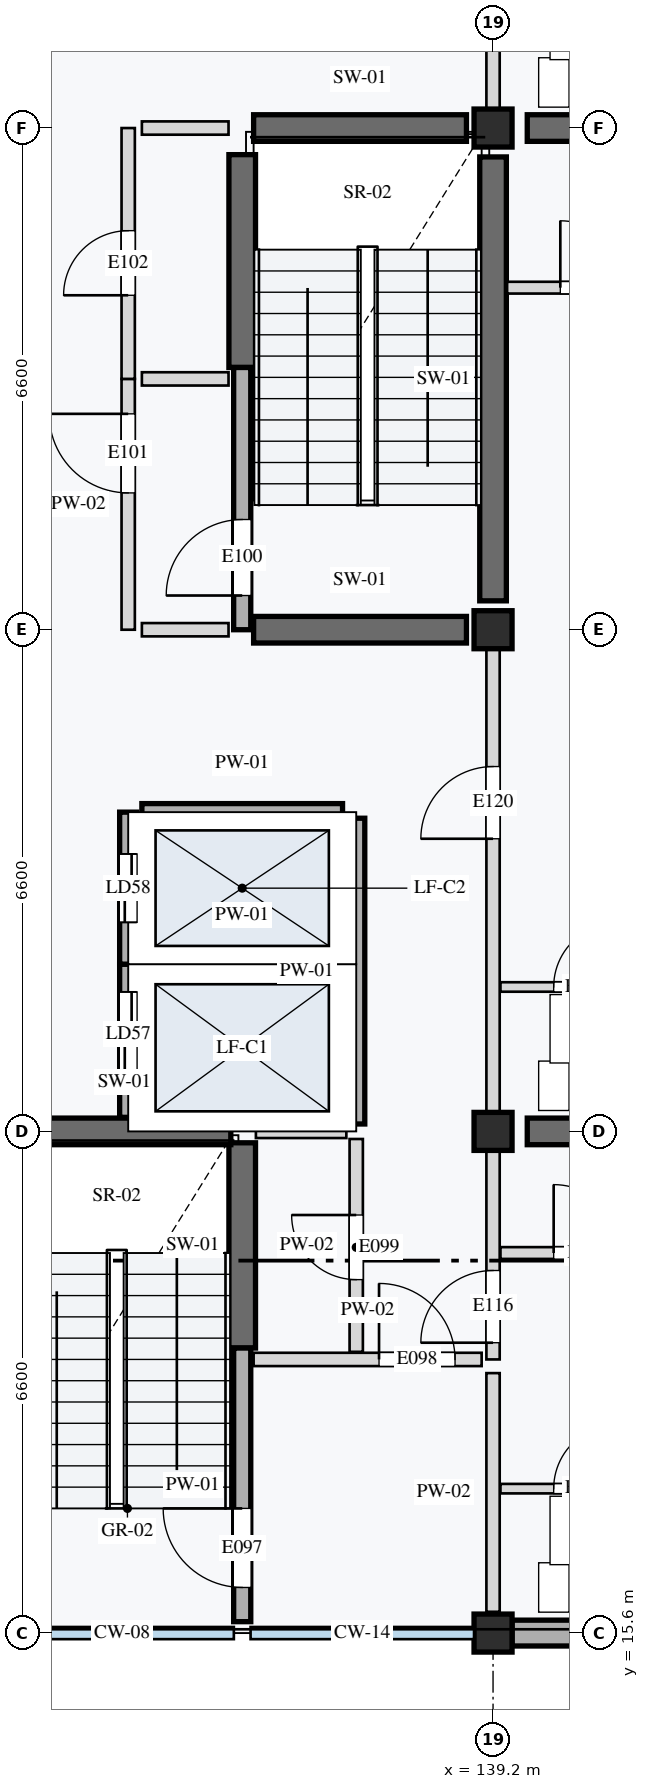
"""IFC4 building model, lengths in metres.
Left out: names, types, materials, properties, quantities, classifications, styles, units other than length and angle.
Written with IfcOpenShell. Run it as: python <this file> out.ifc"""

import sys

from ifc_helpers import new_model, si_unit, direction, frame, frame_2d, origin, origin_2d, place, context, subcontext, project, spatial, rectangle, extrude, element, fill, save


model = new_model("IFC4")
c1 = context("Model", 3, precision=1e-05, world=origin(), true_north=direction((0.0, 1.0)))
c2 = subcontext(c1, "Body", "Model", "MODEL_VIEW")
j1 = project(units=[si_unit("LENGTHUNIT", "METRE"), si_unit("PLANEANGLEUNIT", "RADIAN")], contexts=[c1])
p1 = place(None, origin())
s1 = spatial("IfcSite", under=j1, at=p1, CompositionType="ELEMENT")
p2 = place(p1, origin())
s2 = spatial("IfcBuilding", under=s1, at=p2, CompositionType="ELEMENT")
p3 = place(p2, frame((0.0, 0.0, 4.2)))
s3 = spatial("IfcBuildingStorey", under=s2, at=p3, CompositionType="ELEMENT", Elevation=4.2)
for number, where, z_axis, x_axis in (
    (1, (139.2, 15.6, 0.0), (0.0, 0.0, 1.0), (1.0, 0.0, 0.0)),
    (2, (139.2, 22.2, 0.0), (0.0, 0.0, 1.0), (1.0, 0.0, 0.0)),
    (3, (139.2, 28.8, 0.0), (0.0, 0.0, 1.0), (1.0, 0.0, 0.0)),
    (4, (139.2, 35.4, 0.0), (0.0, 0.0, 1.0), (1.0, 0.0, 0.0)),
):
    element("IfcColumn", number, at=place(p3, frame(where, z_axis=z_axis, x_axis=x_axis)), inside=s3, PredefinedType="COLUMN", context=c2, shape_type="SweptSolid", body=[
        extrude(rectangle(XDim=0.5, YDim=0.5, at=origin_2d()), origin(), (0.0, 0.0, 1.0), 4.2),
    ])
p4 = place(p3, frame((135.9, 19.35, 0.0), z_axis=(0.0, 0.0, 1.0), x_axis=(0.0, 1.0, 0.0)))
e5 = element("IfcWall", 5, at=p4, inside=s3, PredefinedType="SHEAR", context=c2, shape_type="SweptSolid", body=[
    extrude(rectangle(XDim=2.7, YDim=0.35, at=frame_2d((1.35, 0.0))), origin(), (0.0, 0.0, 1.0), 3.96),
])
p5 = place(p3, frame((132.95, 22.2, 0.0), z_axis=(0.0, 0.0, 1.0), x_axis=(1.0, 0.0, 0.0)))
e6 = element("IfcWall", 6, at=p5, inside=s3, PredefinedType="SHEAR", context=c2, shape_type="SweptSolid", body=[
    extrude(rectangle(XDim=2.8, YDim=0.35, at=frame_2d((1.4, 0.0))), origin(), (0.0, 0.0, 1.0), 3.96),
])
p6 = place(p3, frame((139.2, 29.18, 0.0), z_axis=(0.0, 0.0, 1.0), x_axis=(0.0, 1.0, 0.0)))
e7 = element("IfcWall", 7, at=p6, inside=s3, PredefinedType="SHEAR", context=c2, shape_type="SweptSolid", body=[
    extrude(rectangle(XDim=5.84, YDim=0.35, at=frame_2d((2.92, 0.0))), origin(), (0.0, 0.0, 1.0), 3.96),
])
for number, where, z_axis, x_axis in (
    (8, (135.9, 32.25, 0.0), (0.0, 0.0, 1.0), (0.0, 1.0, 0.0)),
    (9, (136.05, 28.8, 0.0), (0.0, 0.0, 1.0), (1.0, 0.0, 0.0)),
    (10, (136.05, 35.4, 0.0), (0.0, 0.0, 1.0), (1.0, 0.0, 0.0)),
):
    element("IfcWall", number, at=place(p3, frame(where, z_axis=z_axis, x_axis=x_axis)), inside=s3, PredefinedType="SHEAR", context=c2, shape_type="SweptSolid", body=[
        extrude(rectangle(XDim=2.8, YDim=0.35, at=frame_2d((1.4, 0.0))), origin(), (0.0, 0.0, 1.0), 3.96),
    ])
for number, where, z_axis, x_axis in (
    (11, (139.65, 22.2, 0.0), (0.0, 0.0, 1.0), (1.0, 0.0, 0.0)),
    (12, (139.65, 35.4, 0.0), (0.0, 0.0, 1.0), (1.0, 0.0, 0.0)),
):
    element("IfcWall", number, at=place(p3, frame(where, z_axis=z_axis, x_axis=x_axis)), inside=s3, PredefinedType="SHEAR", context=c2, shape_type="SweptSolid", body=[
        extrude(rectangle(XDim=5.7, YDim=0.35, at=frame_2d((2.85, 0.0))), origin(), (0.0, 0.0, 1.0), 3.96),
    ])
p7 = place(p3, frame((139.45, 15.6, 0.0), z_axis=(0.0, 0.0, 1.0), x_axis=(1.0, 0.0, 0.0)))
e13 = element("IfcWall", 13, at=p7, inside=s3, PredefinedType="STANDARD", context=c2, shape_type="SweptSolid", body=[
    extrude(rectangle(XDim=6.1, YDim=0.34, at=frame_2d((3.05, 0.0))), origin(), (0.0, 0.0, 1.0), 3.65),
])
p8 = place(p3, frame((135.9, 15.75, 0.0), z_axis=(0.0, 0.0, 1.0), x_axis=(0.0, 1.0, 0.0)))
e14 = element("IfcWall", 14, at=p8, inside=s3, PredefinedType="STANDARD", context=c2, shape_type="SweptSolid", body=[
    extrude(rectangle(XDim=3.6, YDim=0.225, at=frame_2d((1.8, 0.0))), origin(), (0.0, 0.0, 1.0), 3.96),
])
p9 = place(p8, frame((0.45, 0.0, 0.0)))
e15 = element("IfcOpeningElement", 15, at=p9, cuts=e14, PredefinedType="OPENING", context=c2, shape_type="SweptSolid", body=[
    extrude(rectangle(XDim=1.04, YDim=2.12, at=frame_2d((0.52, 1.06))), frame((0.0, 0.123, 0.0), z_axis=(0.0, -1.0, 0.0), x_axis=(1.0, 0.0, 0.0)), (0.0, 0.0, 1.0), 0.245),
])
p10 = place(p3, frame((136.05, 19.2, 0.0), z_axis=(0.0, 0.0, 1.0), x_axis=(1.0, 0.0, 0.0)))
e16 = element("IfcWall", 16, at=p10, inside=s3, PredefinedType="PARTITIONING", context=c2, shape_type="SweptSolid", body=[
    extrude(rectangle(XDim=3.0, YDim=0.175, at=frame_2d((1.5, 0.0))), origin(), (0.0, 0.0, 1.0), 3.96),
])
p11 = place(p10, frame((1.65, 0.0, 0.0)))
e17 = element("IfcOpeningElement", 17, at=p11, cuts=e16, PredefinedType="OPENING", context=c2, shape_type="SweptSolid", body=[
    extrude(rectangle(XDim=1.0, YDim=2.1, at=frame_2d((0.5, 1.05))), frame((0.0, 0.097, 0.0), z_axis=(0.0, -1.0, 0.0), x_axis=(1.0, 0.0, 0.0)), (0.0, 0.0, 1.0), 0.195),
])
p12 = place(p3, frame((137.4, 19.3, 0.0), z_axis=(0.0, 0.0, 1.0), x_axis=(0.0, 1.0, 0.0)))
e18 = element("IfcWall", 18, at=p12, inside=s3, PredefinedType="PARTITIONING", context=c2, shape_type="SweptSolid", body=[
    extrude(rectangle(XDim=2.8, YDim=0.175, at=frame_2d((1.4, 0.0))), origin(), (0.0, 0.0, 1.0), 3.96),
])
p13 = place(p12, frame((0.95, 0.0, 0.0)))
e19 = element("IfcOpeningElement", 19, at=p13, cuts=e18, PredefinedType="OPENING", context=c2, shape_type="SweptSolid", body=[
    extrude(rectangle(XDim=0.85, YDim=2.0, at=frame_2d((0.425, 1.0))), frame((0.0, 0.097, 0.0), z_axis=(0.0, -1.0, 0.0), x_axis=(1.0, 0.0, 0.0)), (0.0, 0.0, 1.0), 0.195),
])
p14 = place(p3, frame((136.08, 22.2, 0.0), z_axis=(0.0, 0.0, 1.0), x_axis=(1.0, 0.0, 0.0)))
e20 = element("IfcWall", 20, at=p14, inside=s3, PredefinedType="PARTITIONING", context=c2, shape_type="SweptSolid", body=[
    extrude(rectangle(XDim=1.19, YDim=0.175, at=frame_2d((0.595, 0.0))), origin(), (0.0, 0.0, 1.0), 3.96),
])
p15 = place(p3, frame((134.4, 22.385, 0.0), z_axis=(0.0, 0.0, 1.0), x_axis=(0.0, 1.0, 0.0)))
e21 = element("IfcWall", 21, at=p15, inside=s3, PredefinedType="STANDARD", context=c2, shape_type="SweptSolid", body=[
    extrude(rectangle(XDim=2.015, YDim=0.225, at=frame_2d((1.007, 0.0))), origin(), (0.0, 0.0, 1.0), 3.96),
])
p16 = place(p15, frame((0.55, 0.0, 0.0)))
e22 = element("IfcOpeningElement", 22, at=p16, cuts=e21, PredefinedType="OPENING", context=c2, shape_type="SweptSolid", body=[
    extrude(rectangle(XDim=1.1, YDim=2.1, at=frame_2d((0.55, 1.05))), frame((0.0, 0.123, 0.0), z_axis=(0.0, -1.0, 0.0), x_axis=(1.0, 0.0, 0.0)), (0.0, 0.0, 1.0), 0.245),
])
p17 = place(p3, frame((134.4, 24.4, 0.0), z_axis=(0.0, 0.0, 1.0), x_axis=(0.0, 1.0, 0.0)))
e23 = element("IfcWall", 23, at=p17, inside=s3, PredefinedType="STANDARD", context=c2, shape_type="SweptSolid", body=[
    extrude(rectangle(XDim=2.0, YDim=0.225, at=frame_2d((1.0, 0.0))), origin(), (0.0, 0.0, 1.0), 3.96),
])
p18 = place(p17, frame((0.55, 0.0, 0.0)))
e24 = element("IfcOpeningElement", 24, at=p18, cuts=e23, PredefinedType="OPENING", context=c2, shape_type="SweptSolid", body=[
    extrude(rectangle(XDim=0.9, YDim=2.1, at=frame_2d((0.45, 1.05))), frame((0.0, 0.123, 0.0), z_axis=(0.0, -1.0, 0.0), x_axis=(1.0, 0.0, 0.0)), (0.0, 0.0, 1.0), 0.245),
])
p19 = place(p3, frame((137.4, 22.298, 0.0), z_axis=(0.0, 0.0, 1.0), x_axis=(0.0, 1.0, 0.0)))
e25 = element("IfcWall", 25, at=p19, inside=s3, PredefinedType="STANDARD", context=c2, shape_type="SweptSolid", body=[
    extrude(rectangle(XDim=4.022, YDim=0.225, at=frame_2d((2.011, 0.0))), origin(), (0.0, 0.0, 1.0), 3.96),
])
for number, where, z_axis, x_axis in (
    (26, (134.58, 24.4, 0.0), (0.0, 0.0, 1.0), (1.0, 0.0, 0.0)),
    (27, (134.58, 26.4, 0.0), (0.0, 0.0, 1.0), (1.0, 0.0, 0.0)),
):
    element("IfcWall", number, at=place(p3, frame(where, z_axis=z_axis, x_axis=x_axis)), inside=s3, PredefinedType="STANDARD", context=c2, shape_type="SweptSolid", body=[
        extrude(rectangle(XDim=2.64, YDim=0.225, at=frame_2d((1.32, 0.0))), origin(), (0.0, 0.0, 1.0), 3.96),
    ])
p20 = place(p3, frame((135.9, 28.8, 0.0), z_axis=(0.0, 0.0, 1.0), x_axis=(0.0, 1.0, 0.0)))
e28 = element("IfcWall", 28, at=p20, inside=s3, PredefinedType="STANDARD", context=c2, shape_type="SweptSolid", body=[
    extrude(rectangle(XDim=3.45, YDim=0.225, at=frame_2d((1.725, 0.0))), origin(), (0.0, 0.0, 1.0), 3.96),
])
p21 = place(p20, frame((0.45, 0.0, 0.0)))
e29 = element("IfcOpeningElement", 29, at=p21, cuts=e28, PredefinedType="OPENING", context=c2, shape_type="SweptSolid", body=[
    extrude(rectangle(XDim=1.0, YDim=2.16, at=frame_2d((0.5, 1.08))), frame((0.0, 0.123, 0.0), z_axis=(0.0, -1.0, 0.0), x_axis=(1.0, 0.0, 0.0)), (0.0, 0.0, 1.0), 0.245),
])
p22 = place(p3, frame((134.4, 28.8, 0.0), z_axis=(0.0, 0.0, 1.0), x_axis=(0.0, 1.0, 0.0)))
e30 = element("IfcWall", 30, at=p22, inside=s3, PredefinedType="PARTITIONING", context=c2, shape_type="SweptSolid", body=[
    extrude(rectangle(XDim=3.3, YDim=0.175, at=frame_2d((1.65, 0.0))), origin(), (0.0, 0.0, 1.0), 3.96),
])
p23 = place(p22, frame((1.8, 0.0, 0.0)))
e31 = element("IfcOpeningElement", 31, at=p23, cuts=e30, PredefinedType="OPENING", context=c2, shape_type="SweptSolid", body=[
    extrude(rectangle(XDim=1.04, YDim=2.12, at=frame_2d((0.52, 1.06))), frame((0.0, 0.097, 0.0), z_axis=(0.0, -1.0, 0.0), x_axis=(1.0, 0.0, 0.0)), (0.0, 0.0, 1.0), 0.195),
])
p24 = place(p3, frame((134.4, 32.1, 0.0), z_axis=(0.0, 0.0, 1.0), x_axis=(0.0, 1.0, 0.0)))
e32 = element("IfcWall", 32, at=p24, inside=s3, PredefinedType="PARTITIONING", context=c2, shape_type="SweptSolid", body=[
    extrude(rectangle(XDim=3.3, YDim=0.175, at=frame_2d((1.65, 0.0))), origin(), (0.0, 0.0, 1.0), 3.96),
])
p25 = place(p24, frame((1.1, 0.0, 0.0)))
e33 = element("IfcOpeningElement", 33, at=p25, cuts=e32, PredefinedType="OPENING", context=c2, shape_type="SweptSolid", body=[
    extrude(rectangle(XDim=0.85, YDim=2.0, at=frame_2d((0.425, 1.0))), frame((0.0, 0.097, 0.0), z_axis=(0.0, -1.0, 0.0), x_axis=(1.0, 0.0, 0.0)), (0.0, 0.0, 1.0), 0.195),
])
p26 = place(p3, frame((134.58, 28.8, 0.0), z_axis=(0.0, 0.0, 1.0), x_axis=(1.0, 0.0, 0.0)))
e34 = element("IfcWall", 34, at=p26, inside=s3, PredefinedType="PARTITIONING", context=c2, shape_type="SweptSolid", body=[
    extrude(rectangle(XDim=1.14, YDim=0.175, at=frame_2d((0.57, 0.0))), origin(), (0.0, 0.0, 1.0), 3.75),
])
for number, where, z_axis, x_axis in (
    (35, (134.58, 32.1, 0.0), (0.0, 0.0, 1.0), (1.0, 0.0, 0.0)),
    (36, (134.58, 35.4, 0.0), (0.0, 0.0, 1.0), (1.0, 0.0, 0.0)),
):
    element("IfcWall", number, at=place(p3, frame(where, z_axis=z_axis, x_axis=x_axis)), inside=s3, PredefinedType="PARTITIONING", context=c2, shape_type="SweptSolid", body=[
        extrude(rectangle(XDim=1.14, YDim=0.175, at=frame_2d((0.57, 0.0))), origin(), (0.0, 0.0, 1.0), 3.96),
    ])
p27 = place(p3, frame((139.2, 15.88, 0.0), z_axis=(0.0, 0.0, 1.0), x_axis=(0.0, 1.0, 0.0)))
e37 = element("IfcWall", 37, at=p27, inside=s3, PredefinedType="PARTITIONING", context=c2, shape_type="SweptSolid", body=[
    extrude(rectangle(XDim=3.14, YDim=0.175, at=frame_2d((1.57, 0.0))), origin(), (0.0, 0.0, 1.0), 3.7),
])
p28 = place(p3, frame((139.2, 19.2, 0.0), z_axis=(0.0, 0.0, 1.0), x_axis=(0.0, 1.0, 0.0)))
e38 = element("IfcWall", 38, at=p28, inside=s3, PredefinedType="PARTITIONING", context=c2, shape_type="SweptSolid", body=[
    extrude(rectangle(XDim=3.0, YDim=0.175, at=frame_2d((1.5, 0.0))), origin(), (0.0, 0.0, 1.0), 3.7),
])
p29 = place(p28, frame((0.22, 0.0, 0.0)))
e39 = element("IfcOpeningElement", 39, at=p29, cuts=e38, PredefinedType="OPENING", context=c2, shape_type="SweptSolid", body=[
    extrude(rectangle(XDim=0.95, YDim=2.16, at=frame_2d((0.475, 1.08))), frame((0.0, 0.097, 0.0), z_axis=(0.0, -1.0, 0.0), x_axis=(1.0, 0.0, 0.0)), (0.0, 0.0, 1.0), 0.195),
])
p30 = place(p3, frame((139.298, 17.5, 0.0), z_axis=(0.0, 0.0, 1.0), x_axis=(1.0, 0.0, 0.0)))
e40 = element("IfcWall", 40, at=p30, inside=s3, PredefinedType="PARTITIONING", context=c2, shape_type="SweptSolid", body=[
    extrude(rectangle(XDim=2.302, YDim=0.125, at=frame_2d((1.151, 0.0))), origin(), (0.0, 0.0, 1.0), 3.96),
])
p31 = place(p30, frame((0.7, 0.0, 0.0)))
e41 = element("IfcOpeningElement", 41, at=p31, cuts=e40, PredefinedType="OPENING", context=c2, shape_type="SweptSolid", body=[
    extrude(rectangle(XDim=0.84, YDim=2.06, at=frame_2d((0.42, 1.03))), frame((0.0, 0.073, 0.0), z_axis=(0.0, -1.0, 0.0), x_axis=(1.0, 0.0, 0.0)), (0.0, 0.0, 1.0), 0.145),
])
p32 = place(p3, frame((139.298, 20.6, 0.0), z_axis=(0.0, 0.0, 1.0), x_axis=(1.0, 0.0, 0.0)))
e42 = element("IfcWall", 42, at=p32, inside=s3, PredefinedType="PARTITIONING", context=c2, shape_type="SweptSolid", body=[
    extrude(rectangle(XDim=2.302, YDim=0.155, at=frame_2d((1.151, 0.0))), origin(), (0.0, 0.0, 1.0), 3.96),
])
p33 = place(p32, frame((0.7, 0.0, 0.0)))
e43 = element("IfcOpeningElement", 43, at=p33, cuts=e42, PredefinedType="OPENING", context=c2, shape_type="SweptSolid", body=[
    extrude(rectangle(XDim=0.9, YDim=2.1, at=frame_2d((0.45, 1.05))), frame((0.0, 0.087, 0.0), z_axis=(0.0, -1.0, 0.0), x_axis=(1.0, 0.0, 0.0)), (0.0, 0.0, 1.0), 0.175),
])
p34 = place(p3, frame((139.2, 22.2, 0.0), z_axis=(0.0, 0.0, 1.0), x_axis=(0.0, 1.0, 0.0)))
e44 = element("IfcWall", 44, at=p34, inside=s3, PredefinedType="PARTITIONING", context=c2, shape_type="SweptSolid", body=[
    extrude(rectangle(XDim=6.6, YDim=0.175, at=frame_2d((3.3, 0.0))), origin(), (0.0, 0.0, 1.0), 3.7),
])
p35 = place(p34, frame((3.85, 0.0, 0.0)))
e45 = element("IfcOpeningElement", 45, at=p35, cuts=e44, PredefinedType="OPENING", context=c2, shape_type="SweptSolid", body=[
    extrude(rectangle(XDim=0.95, YDim=2.16, at=frame_2d((0.475, 1.08))), frame((0.0, 0.097, 0.0), z_axis=(0.0, -1.0, 0.0), x_axis=(1.0, 0.0, 0.0)), (0.0, 0.0, 1.0), 0.195),
])
p36 = place(p3, frame((139.298, 24.1, 0.0), z_axis=(0.0, 0.0, 1.0), x_axis=(1.0, 0.0, 0.0)))
e46 = element("IfcWall", 46, at=p36, inside=s3, PredefinedType="PARTITIONING", context=c2, shape_type="SweptSolid", body=[
    extrude(rectangle(XDim=2.302, YDim=0.125, at=frame_2d((1.151, 0.0))), origin(), (0.0, 0.0, 1.0), 3.96),
])
p37 = place(p36, frame((0.7, 0.0, 0.0)))
e47 = element("IfcOpeningElement", 47, at=p37, cuts=e46, PredefinedType="OPENING", context=c2, shape_type="SweptSolid", body=[
    extrude(rectangle(XDim=0.84, YDim=2.06, at=frame_2d((0.42, 1.03))), frame((0.0, 0.073, 0.0), z_axis=(0.0, -1.0, 0.0), x_axis=(1.0, 0.0, 0.0)), (0.0, 0.0, 1.0), 0.145),
])
p38 = place(p3, frame((139.385, 33.3, 0.0), z_axis=(0.0, 0.0, 1.0), x_axis=(1.0, 0.0, 0.0)))
e48 = element("IfcWall", 48, at=p38, inside=s3, PredefinedType="PARTITIONING", context=c2, shape_type="SweptSolid", body=[
    extrude(rectangle(XDim=2.215, YDim=0.155, at=frame_2d((1.107, 0.0))), origin(), (0.0, 0.0, 1.0), 3.96),
])
p39 = place(p38, frame((0.7, 0.0, 0.0)))
e49 = element("IfcOpeningElement", 49, at=p39, cuts=e48, PredefinedType="OPENING", context=c2, shape_type="SweptSolid", body=[
    extrude(rectangle(XDim=0.88, YDim=2.16, at=frame_2d((0.44, 1.08))), frame((0.0, 0.087, 0.0), z_axis=(0.0, -1.0, 0.0), x_axis=(1.0, 0.0, 0.0)), (0.0, 0.0, 1.0), 0.175),
])
p40 = place(p3, frame((139.2, 35.4, 0.0), z_axis=(0.0, 0.0, 1.0), x_axis=(0.0, 1.0, 0.0)))
e50 = element("IfcWall", 50, at=p40, inside=s3, PredefinedType="PARTITIONING", context=c2, shape_type="SweptSolid", body=[
    extrude(rectangle(XDim=6.6, YDim=0.175, at=frame_2d((3.3, 0.0))), origin(), (0.0, 0.0, 1.0), 3.7),
])
p41 = place(p40, frame((2.725, 0.0, 0.0)))
e51 = element("IfcOpeningElement", 51, at=p41, cuts=e50, PredefinedType="OPENING", context=c2, shape_type="SweptSolid", body=[
    extrude(rectangle(XDim=0.96, YDim=2.18, at=frame_2d((0.48, 1.09))), frame((0.0, 0.097, 0.0), z_axis=(0.0, -1.0, 0.0), x_axis=(1.0, 0.0, 0.0)), (0.0, 0.0, 1.0), 0.195),
])
p42 = place(p9, origin())
e52 = element("IfcDoor", 52, at=p42, inside=s3, OperationType="SINGLE_SWING_RIGHT", PredefinedType="DOOR", context=c2, shape_type="SweptSolid", body=[
    extrude(rectangle(XDim=1.04, YDim=2.12, at=frame_2d((0.52, 1.06))), frame((0.0, 0.025, 0.0), z_axis=(0.0, -1.0, 0.0), x_axis=(1.0, 0.0, 0.0)), (0.0, 0.0, 1.0), 0.05),
])
fill(e15, e52)
p43 = place(p11, origin())
e53 = element("IfcDoor", 53, at=p43, inside=s3, OperationType="SINGLE_SWING_LEFT", PredefinedType="DOOR", context=c2, shape_type="SweptSolid", body=[
    extrude(rectangle(XDim=1.0, YDim=2.1, at=frame_2d((0.5, 1.05))), frame((0.0, 0.025, 0.0), z_axis=(0.0, -1.0, 0.0), x_axis=(1.0, 0.0, 0.0)), (0.0, 0.0, 1.0), 0.05),
])
fill(e17, e53)
p44 = place(p13, origin())
e54 = element("IfcDoor", 54, at=p44, inside=s3, OperationType="SINGLE_SWING_RIGHT", PredefinedType="DOOR", context=c2, shape_type="SweptSolid", body=[
    extrude(rectangle(XDim=0.85, YDim=2.0, at=frame_2d((0.425, 1.0))), frame((0.0, 0.025, 0.0), z_axis=(0.0, -1.0, 0.0), x_axis=(1.0, 0.0, 0.0)), (0.0, 0.0, 1.0), 0.05),
])
fill(e19, e54)
p45 = place(p16, origin())
e55 = element("IfcDoor", 55, at=p45, inside=s3, OperationType="DOUBLE_DOOR_SLIDING", PredefinedType="DOOR", context=c2, shape_type="SweptSolid", body=[
    extrude(rectangle(XDim=1.1, YDim=2.1, at=frame_2d((0.55, 1.05))), frame((0.0, 0.025, 0.0), z_axis=(0.0, -1.0, 0.0), x_axis=(1.0, 0.0, 0.0)), (0.0, 0.0, 1.0), 0.05),
])
fill(e22, e55)
p46 = place(p18, origin())
e56 = element("IfcDoor", 56, at=p46, inside=s3, OperationType="DOUBLE_DOOR_SLIDING", PredefinedType="DOOR", context=c2, shape_type="SweptSolid", body=[
    extrude(rectangle(XDim=0.9, YDim=2.1, at=frame_2d((0.45, 1.05))), frame((0.0, 0.025, 0.0), z_axis=(0.0, -1.0, 0.0), x_axis=(1.0, 0.0, 0.0)), (0.0, 0.0, 1.0), 0.05),
])
fill(e24, e56)
p47 = place(p21, origin())
e57 = element("IfcDoor", 57, at=p47, inside=s3, OperationType="SINGLE_SWING_LEFT", PredefinedType="DOOR", context=c2, shape_type="SweptSolid", body=[
    extrude(rectangle(XDim=1.0, YDim=2.16, at=frame_2d((0.5, 1.08))), frame((0.0, 0.025, 0.0), z_axis=(0.0, -1.0, 0.0), x_axis=(1.0, 0.0, 0.0)), (0.0, 0.0, 1.0), 0.05),
])
fill(e29, e57)
p48 = place(p23, origin())
e58 = element("IfcDoor", 58, at=p48, inside=s3, OperationType="SINGLE_SWING_RIGHT", PredefinedType="DOOR", context=c2, shape_type="SweptSolid", body=[
    extrude(rectangle(XDim=1.04, YDim=2.12, at=frame_2d((0.52, 1.06))), frame((0.0, 0.025, 0.0), z_axis=(0.0, -1.0, 0.0), x_axis=(1.0, 0.0, 0.0)), (0.0, 0.0, 1.0), 0.05),
])
fill(e31, e58)
p49 = place(p25, origin())
e59 = element("IfcDoor", 59, at=p49, inside=s3, OperationType="SINGLE_SWING_LEFT", PredefinedType="DOOR", context=c2, shape_type="SweptSolid", body=[
    extrude(rectangle(XDim=0.85, YDim=2.0, at=frame_2d((0.425, 1.0))), frame((0.0, 0.025, 0.0), z_axis=(0.0, -1.0, 0.0), x_axis=(1.0, 0.0, 0.0)), (0.0, 0.0, 1.0), 0.05),
])
fill(e33, e59)
p50 = place(p29, origin())
e60 = element("IfcDoor", 60, at=p50, inside=s3, OperationType="SINGLE_SWING_LEFT", PredefinedType="DOOR", context=c2, shape_type="SweptSolid", body=[
    extrude(rectangle(XDim=0.95, YDim=2.16, at=frame_2d((0.475, 1.08))), frame((0.0, 0.025, 0.0), z_axis=(0.0, -1.0, 0.0), x_axis=(1.0, 0.0, 0.0)), (0.0, 0.0, 1.0), 0.05),
])
fill(e39, e60)
p51 = place(p31, origin())
e61 = element("IfcDoor", 61, at=p51, inside=s3, OperationType="SINGLE_SWING_RIGHT", PredefinedType="DOOR", context=c2, shape_type="SweptSolid", body=[
    extrude(rectangle(XDim=0.84, YDim=2.06, at=frame_2d((0.42, 1.03))), frame((0.0, 0.025, 0.0), z_axis=(0.0, -1.0, 0.0), x_axis=(1.0, 0.0, 0.0)), (0.0, 0.0, 1.0), 0.05),
])
fill(e41, e61)
p52 = place(p33, origin())
e62 = element("IfcDoor", 62, at=p52, inside=s3, OperationType="SINGLE_SWING_LEFT", PredefinedType="DOOR", context=c2, shape_type="SweptSolid", body=[
    extrude(rectangle(XDim=0.9, YDim=2.1, at=frame_2d((0.45, 1.05))), frame((0.0, 0.025, 0.0), z_axis=(0.0, -1.0, 0.0), x_axis=(1.0, 0.0, 0.0)), (0.0, 0.0, 1.0), 0.05),
])
fill(e43, e62)
p53 = place(p35, origin())
e63 = element("IfcDoor", 63, at=p53, inside=s3, OperationType="SINGLE_SWING_LEFT", PredefinedType="DOOR", context=c2, shape_type="SweptSolid", body=[
    extrude(rectangle(XDim=0.95, YDim=2.16, at=frame_2d((0.475, 1.08))), frame((0.0, 0.025, 0.0), z_axis=(0.0, -1.0, 0.0), x_axis=(1.0, 0.0, 0.0)), (0.0, 0.0, 1.0), 0.05),
])
fill(e45, e63)
p54 = place(p37, origin())
e64 = element("IfcDoor", 64, at=p54, inside=s3, OperationType="SINGLE_SWING_RIGHT", PredefinedType="DOOR", context=c2, shape_type="SweptSolid", body=[
    extrude(rectangle(XDim=0.84, YDim=2.06, at=frame_2d((0.42, 1.03))), frame((0.0, 0.025, 0.0), z_axis=(0.0, -1.0, 0.0), x_axis=(1.0, 0.0, 0.0)), (0.0, 0.0, 1.0), 0.05),
])
fill(e47, e64)
p55 = place(p39, origin())
e65 = element("IfcDoor", 65, at=p55, inside=s3, OperationType="SINGLE_SWING_LEFT", PredefinedType="DOOR", context=c2, shape_type="SweptSolid", body=[
    extrude(rectangle(XDim=0.88, YDim=2.16, at=frame_2d((0.44, 1.08))), frame((0.0, 0.025, 0.0), z_axis=(0.0, -1.0, 0.0), x_axis=(1.0, 0.0, 0.0)), (0.0, 0.0, 1.0), 0.05),
])
fill(e49, e65)
save(model, sys.argv[1])
